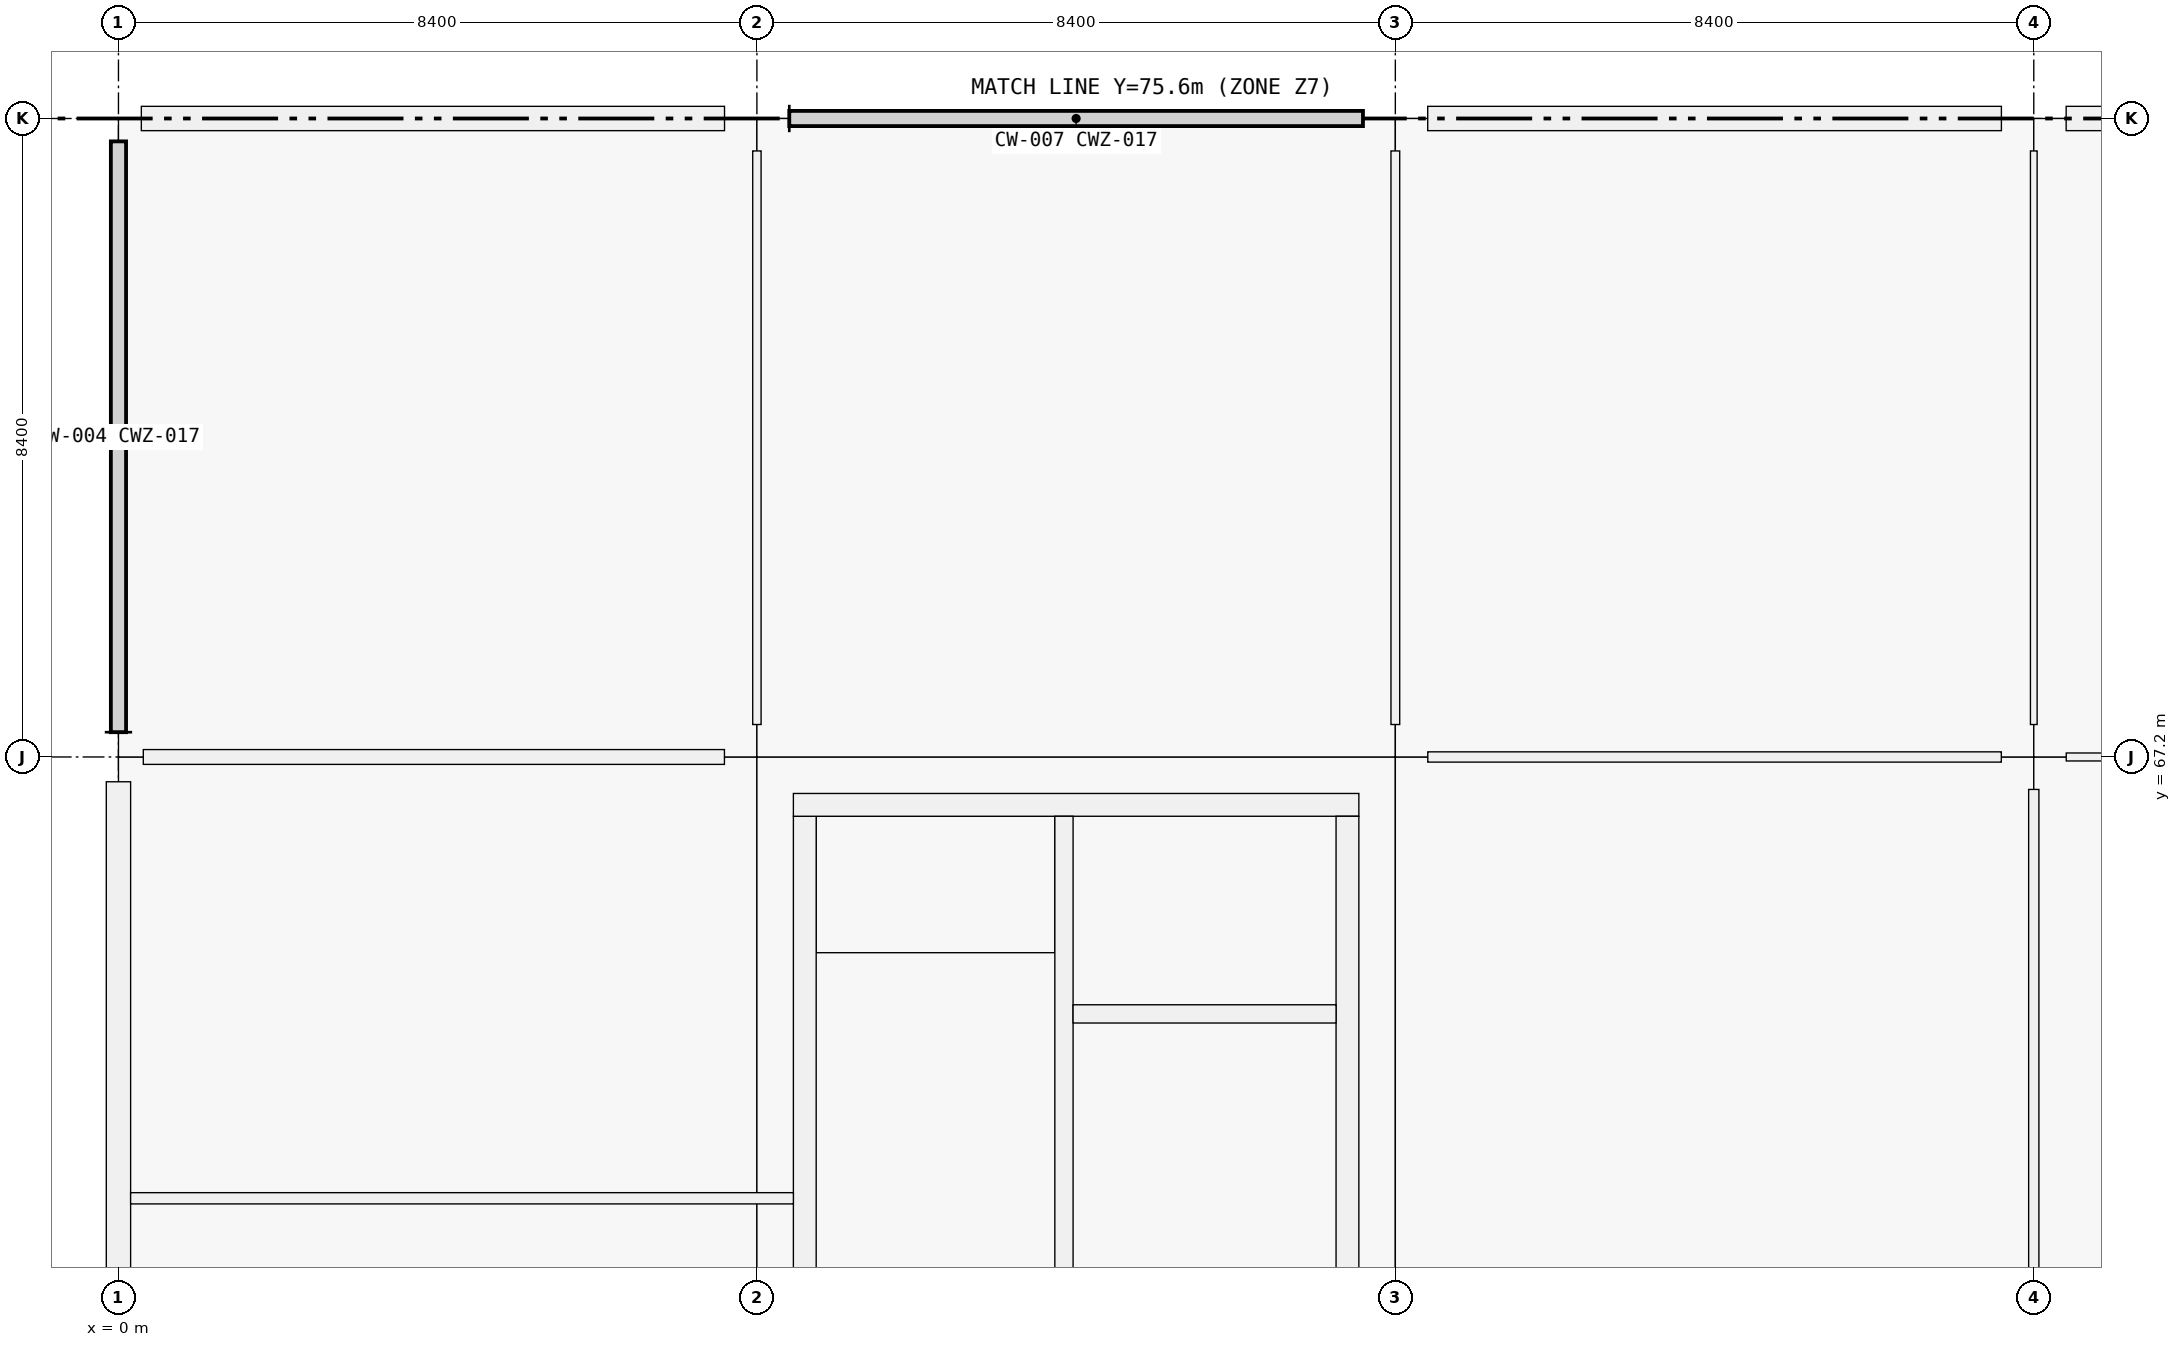
"""IFC4 building model, lengths in metres.
Left out: names, types, materials, properties, quantities, classifications, styles, units other than length and angle.
Written with IfcOpenShell. Run it as: python <this file> out.ifc"""

import sys

from ifc_helpers import new_model, si_unit, direction, frame, frame_2d, origin, origin_2d, place, context, subcontext, project, spatial, rectangle, extrude, element, fill, save


model = new_model("IFC4")
c1 = context("Model", 3, precision=1e-05, world=origin(), true_north=direction((0.0, 1.0)))
c2 = subcontext(c1, "Body", "Model", "MODEL_VIEW")
j1 = project(units=[si_unit("LENGTHUNIT", "METRE"), si_unit("PLANEANGLEUNIT", "RADIAN")], contexts=[c1])
p1 = place(None, origin())
s1 = spatial("IfcSite", under=j1, at=p1, CompositionType="ELEMENT")
p2 = place(p1, origin())
s2 = spatial("IfcBuilding", under=s1, at=p2, CompositionType="ELEMENT")
p3 = place(p2, origin())
s3 = spatial("IfcBuildingStorey", under=s2, at=p3, CompositionType="ELEMENT", Elevation=0.0)
p4 = place(p3, frame((0.0, 67.2, 0.0), z_axis=(0.0, 0.0, 1.0), x_axis=(1.0, 0.0, 0.0)))
e1 = element("IfcColumn", 1, at=p4, inside=s3, PredefinedType="COLUMN", context=c2, shape_type="SweptSolid", body=[
    extrude(rectangle(XDim=0.65, YDim=0.65, at=origin_2d()), origin(), (0.0, 0.0, 1.0), 5.76),
])
p5 = place(p3, frame((0.0, 75.6, 0.0), z_axis=(0.0, 0.0, 1.0), x_axis=(1.0, 0.0, 0.0)))
e2 = element("IfcColumn", 2, at=p5, inside=s3, PredefinedType="COLUMN", context=c2, shape_type="SweptSolid", body=[
    extrude(rectangle(XDim=0.6, YDim=0.6, at=origin_2d()), origin(), (0.0, 0.0, 1.0), 5.76),
])
for number, where, z_axis, x_axis in (
    (3, (8.4, 67.2, 0.0), (0.0, 0.0, 1.0), (1.0, 0.0, 0.0)),
    (4, (8.4, 75.6, 0.0), (0.0, 0.0, 1.0), (1.0, 0.0, 0.0)),
    (5, (16.8, 67.2, 0.0), (0.0, 0.0, 1.0), (1.0, 0.0, 0.0)),
    (6, (16.8, 75.6, 0.0), (0.0, 0.0, 1.0), (1.0, 0.0, 0.0)),
    (7, (25.2, 67.2, 0.0), (0.0, 0.0, 1.0), (1.0, 0.0, 0.0)),
    (8, (25.2, 75.6, 0.0), (0.0, 0.0, 1.0), (1.0, 0.0, 0.0)),
):
    element("IfcColumn", number, at=place(p3, frame(where, z_axis=z_axis, x_axis=x_axis)), inside=s3, PredefinedType="COLUMN", context=c2, shape_type="SweptSolid", body=[
        extrude(rectangle(XDim=0.85, YDim=0.85, at=origin_2d()), origin(), (0.0, 0.0, 1.0), 5.76),
    ])
p6 = place(p3, frame((0.0, 59.101, 0.0), z_axis=(0.0, 0.0, 1.0), x_axis=(0.0, 1.0, 0.0)))
e9 = element("IfcWall", 9, at=p6, inside=s3, PredefinedType="SOLIDWALL", context=c2, shape_type="SweptSolid", body=[
    extrude(rectangle(XDim=7.773, YDim=0.32, at=frame_2d((3.886, 0.0))), origin(), (0.0, 0.0, 1.0), 4.7),
])
p7 = place(p6, frame((3.136, 0.0, 0.9)))
e10 = element("IfcOpeningElement", 10, at=p7, cuts=e9, PredefinedType="OPENING", context=c2, shape_type="SweptSolid", body=[
    extrude(rectangle(XDim=1.5, YDim=1.8, at=frame_2d((0.75, 0.9))), frame((0.0, 0.16, 0.0), z_axis=(0.0, -1.0, 0.0), x_axis=(1.0, 0.0, 0.0)), (0.0, 0.0, 1.0), 0.32),
])
p8 = place(p6, frame((0.149, 0.0, 0.0)))
e11 = element("IfcOpeningElement", 11, at=p8, cuts=e9, PredefinedType="OPENING", context=c2, shape_type="SweptSolid", body=[
    extrude(rectangle(XDim=2.0, YDim=2.25, at=frame_2d((1.0, 1.125))), frame((0.0, 0.16, 0.0), z_axis=(0.0, -1.0, 0.0), x_axis=(1.0, 0.0, 0.0)), (0.0, 0.0, 1.0), 0.32),
])
p9 = place(p3, frame((0.301, 75.6, 0.0), z_axis=(0.0, 0.0, 1.0), x_axis=(1.0, 0.0, 0.0)))
e12 = element("IfcWall", 12, at=p9, inside=s3, PredefinedType="SOLIDWALL", context=c2, shape_type="SweptSolid", body=[
    extrude(rectangle(XDim=7.673, YDim=0.32, at=frame_2d((3.836, 0.0))), origin(), (0.0, 0.0, 1.0), 4.7),
])
p10 = place(p9, frame((3.037, 0.0, 0.9)))
e13 = element("IfcOpeningElement", 13, at=p10, cuts=e12, PredefinedType="OPENING", context=c2, shape_type="SweptSolid", body=[
    extrude(rectangle(XDim=1.6, YDim=2.1, at=frame_2d((0.8, 1.05))), frame((0.0, 0.16, 0.0), z_axis=(0.0, -1.0, 0.0), x_axis=(1.0, 0.0, 0.0)), (0.0, 0.0, 1.0), 0.32),
])
p11 = place(p3, frame((17.226, 75.6, 0.0), z_axis=(0.0, 0.0, 1.0), x_axis=(1.0, 0.0, 0.0)))
e14 = element("IfcWall", 14, at=p11, inside=s3, PredefinedType="SOLIDWALL", context=c2, shape_type="SweptSolid", body=[
    extrude(rectangle(XDim=7.548, YDim=0.32, at=frame_2d((3.774, 0.0))), origin(), (0.0, 0.0, 1.0), 4.7),
])
p12 = place(p11, frame((2.474, 0.0, 0.9)))
e15 = element("IfcOpeningElement", 15, at=p12, cuts=e14, PredefinedType="OPENING", context=c2, shape_type="SweptSolid", body=[
    extrude(rectangle(XDim=2.6, YDim=2.1, at=frame_2d((1.3, 1.05))), frame((0.0, 0.16, 0.0), z_axis=(0.0, -1.0, 0.0), x_axis=(1.0, 0.0, 0.0)), (0.0, 0.0, 1.0), 0.32),
])
p13 = place(p3, frame((25.626, 75.6, 0.0), z_axis=(0.0, 0.0, 1.0), x_axis=(1.0, 0.0, 0.0)))
e16 = element("IfcWall", 16, at=p13, inside=s3, PredefinedType="SOLIDWALL", context=c2, shape_type="SweptSolid", body=[
    extrude(rectangle(XDim=7.548, YDim=0.32, at=frame_2d((3.774, 0.0))), origin(), (0.0, 0.0, 1.0), 4.7),
])
p14 = place(p13, frame((2.374, 0.0, 0.9)))
e17 = element("IfcOpeningElement", 17, at=p14, cuts=e16, PredefinedType="OPENING", context=c2, shape_type="SweptSolid", body=[
    extrude(rectangle(XDim=2.8, YDim=1.75, at=frame_2d((1.4, 0.875))), frame((0.0, 0.16, 0.0), z_axis=(0.0, -1.0, 0.0), x_axis=(1.0, 0.0, 0.0)), (0.0, 0.0, 1.0), 0.32),
])
p15 = place(p3, frame((9.03, 59.58, 0.0), z_axis=(0.0, 0.0, 1.0), x_axis=(0.0, 1.0, 0.0)))
e18 = element("IfcWall", 18, at=p15, inside=s3, PredefinedType="SHEAR", context=c2, shape_type="SweptSolid", body=[
    extrude(rectangle(XDim=6.84, YDim=0.3, at=frame_2d((3.42, 0.0))), origin(), (0.0, 0.0, 1.0), 5.76),
])
p16 = place(p15, frame((0.12, 0.0, 0.0)))
e19 = element("IfcOpeningElement", 19, at=p16, cuts=e18, PredefinedType="OPENING", context=c2, shape_type="SweptSolid", body=[
    extrude(rectangle(XDim=1.0, YDim=2.15, at=frame_2d((0.5, 1.075))), frame((0.0, 0.15, 0.0), z_axis=(0.0, -1.0, 0.0), x_axis=(1.0, 0.0, 0.0)), (0.0, 0.0, 1.0), 0.3),
])
p17 = place(p3, frame((8.88, 66.57, 0.0), z_axis=(0.0, 0.0, 1.0), x_axis=(1.0, 0.0, 0.0)))
e20 = element("IfcWall", 20, at=p17, inside=s3, PredefinedType="SHEAR", context=c2, shape_type="SweptSolid", body=[
    extrude(rectangle(XDim=7.44, YDim=0.3, at=frame_2d((3.72, 0.0))), origin(), (0.0, 0.0, 1.0), 5.76),
])
p18 = place(p3, frame((16.17, 66.42, 0.0), z_axis=(0.0, 0.0, 1.0), x_axis=(0.0, -1.0, 0.0)))
e21 = element("IfcWall", 21, at=p18, inside=s3, PredefinedType="SHEAR", context=c2, shape_type="SweptSolid", body=[
    extrude(rectangle(XDim=6.84, YDim=0.3, at=frame_2d((3.42, 0.0))), origin(), (0.0, 0.0, 1.0), 5.76),
])
p19 = place(p3, frame((12.44, 59.58, 0.0), z_axis=(0.0, 0.0, 1.0), x_axis=(0.0, 1.0, 0.0)))
e22 = element("IfcWall", 22, at=p19, inside=s3, PredefinedType="SHEAR", context=c2, shape_type="SweptSolid", body=[
    extrude(rectangle(XDim=6.84, YDim=0.24, at=frame_2d((3.42, 0.0))), origin(), (0.0, 0.0, 1.0), 5.76),
])
p20 = place(p19, frame((0.12, 0.0, 0.0)))
e23 = element("IfcOpeningElement", 23, at=p20, cuts=e22, PredefinedType="OPENING", context=c2, shape_type="SweptSolid", body=[
    extrude(rectangle(XDim=1.0, YDim=2.15, at=frame_2d((0.5, 1.075))), frame((0.0, 0.12, 0.0), z_axis=(0.0, -1.0, 0.0), x_axis=(1.0, 0.0, 0.0)), (0.0, 0.0, 1.0), 0.24),
])
p21 = place(p3, frame((12.56, 63.82, 0.0), z_axis=(0.0, 0.0, 1.0), x_axis=(1.0, 0.0, 0.0)))
e24 = element("IfcWall", 24, at=p21, inside=s3, PredefinedType="SHEAR", context=c2, shape_type="SweptSolid", body=[
    extrude(rectangle(XDim=3.46, YDim=0.24, at=frame_2d((1.73, 0.0))), origin(), (0.0, 0.0, 1.0), 5.76),
])
p22 = place(p21, frame((1.18, 0.0, 0.0)))
e25 = element("IfcOpeningElement", 25, at=p22, cuts=e24, PredefinedType="OPENING", context=c2, shape_type="SweptSolid", body=[
    extrude(rectangle(XDim=1.1, YDim=2.15, at=frame_2d((0.55, 1.075))), frame((0.0, 0.12, 0.0), z_axis=(0.0, -1.0, 0.0), x_axis=(1.0, 0.0, 0.0)), (0.0, 0.0, 1.0), 0.24),
])
p23 = place(p3, frame((0.327, 67.2, 0.0), z_axis=(0.0, 0.0, 1.0), x_axis=(1.0, 0.0, 0.0)))
e26 = element("IfcWall", 26, at=p23, inside=s3, PredefinedType="PARTITIONING", context=c2, shape_type="SweptSolid", body=[
    extrude(rectangle(XDim=7.646, YDim=0.195, at=frame_2d((3.823, 0.0))), origin(), (0.0, 0.0, 1.0), 3.66),
])
p24 = place(p23, frame((3.313, 0.0, 0.0)))
e27 = element("IfcOpeningElement", 27, at=p24, cuts=e26, PredefinedType="OPENING", context=c2, shape_type="SweptSolid", body=[
    extrude(rectangle(XDim=1.02, YDim=2.2, at=frame_2d((0.51, 1.1))), frame((0.0, 0.098, 0.0), z_axis=(0.0, -1.0, 0.0), x_axis=(1.0, 0.0, 0.0)), (0.0, 0.0, 1.0), 0.195),
])
p25 = place(p3, frame((17.227, 67.2, 0.0), z_axis=(0.0, 0.0, 1.0), x_axis=(1.0, 0.0, 0.0)))
e28 = element("IfcWall", 28, at=p25, inside=s3, PredefinedType="PARTITIONING", context=c2, shape_type="SweptSolid", body=[
    extrude(rectangle(XDim=7.546, YDim=0.135, at=frame_2d((3.773, 0.0))), origin(), (0.0, 0.0, 1.0), 3.66),
])
p26 = place(p25, frame((3.283, 0.0, 0.0)))
e29 = element("IfcOpeningElement", 29, at=p26, cuts=e28, PredefinedType="OPENING", context=c2, shape_type="SweptSolid", body=[
    extrude(rectangle(XDim=0.98, YDim=2.18, at=frame_2d((0.49, 1.09))), frame((0.0, 0.067, 0.0), z_axis=(0.0, -1.0, 0.0), x_axis=(1.0, 0.0, 0.0)), (0.0, 0.0, 1.0), 0.135),
])
p27 = place(p3, frame((25.627, 67.2, 0.0), z_axis=(0.0, 0.0, 1.0), x_axis=(1.0, 0.0, 0.0)))
e30 = element("IfcWall", 30, at=p27, inside=s3, PredefinedType="PARTITIONING", context=c2, shape_type="SweptSolid", body=[
    extrude(rectangle(XDim=7.546, YDim=0.105, at=frame_2d((3.773, 0.0))), origin(), (0.0, 0.0, 1.0), 3.66),
])
p28 = place(p27, frame((3.248, 0.0, 0.0)))
e31 = element("IfcOpeningElement", 31, at=p28, cuts=e30, PredefinedType="OPENING", context=c2, shape_type="SweptSolid", body=[
    extrude(rectangle(XDim=1.05, YDim=2.12, at=frame_2d((0.525, 1.06))), frame((0.0, 0.052, 0.0), z_axis=(0.0, -1.0, 0.0), x_axis=(1.0, 0.0, 0.0)), (0.0, 0.0, 1.0), 0.105),
])
p29 = place(p3, frame((8.4, 67.627, 0.0), z_axis=(0.0, 0.0, 1.0), x_axis=(0.0, 1.0, 0.0)))
e32 = element("IfcWall", 32, at=p29, inside=s3, PredefinedType="MOVABLE", context=c2, shape_type="SweptSolid", body=[
    extrude(rectangle(XDim=7.546, YDim=0.11, at=frame_2d((3.773, 0.0))), origin(), (0.0, 0.0, 1.0), 3.66),
])
p30 = place(p29, frame((3.273, 0.0, 0.0)))
e33 = element("IfcOpeningElement", 33, at=p30, cuts=e32, PredefinedType="OPENING", context=c2, shape_type="SweptSolid", body=[
    extrude(rectangle(XDim=1.0, YDim=2.2, at=frame_2d((0.5, 1.1))), frame((0.0, 0.055, 0.0), z_axis=(0.0, -1.0, 0.0), x_axis=(1.0, 0.0, 0.0)), (0.0, 0.0, 1.0), 0.11),
])
p31 = place(p3, frame((16.8, 67.627, 0.0), z_axis=(0.0, 0.0, 1.0), x_axis=(0.0, 1.0, 0.0)))
e34 = element("IfcWall", 34, at=p31, inside=s3, PredefinedType="PARTITIONING", context=c2, shape_type="SweptSolid", body=[
    extrude(rectangle(XDim=7.546, YDim=0.115, at=frame_2d((3.773, 0.0))), origin(), (0.0, 0.0, 1.0), 3.66),
])
p32 = place(p31, frame((3.248, 0.0, 0.0)))
e35 = element("IfcOpeningElement", 35, at=p32, cuts=e34, PredefinedType="OPENING", context=c2, shape_type="SweptSolid", body=[
    extrude(rectangle(XDim=1.05, YDim=2.12, at=frame_2d((0.525, 1.06))), frame((0.0, 0.058, 0.0), z_axis=(0.0, -1.0, 0.0), x_axis=(1.0, 0.0, 0.0)), (0.0, 0.0, 1.0), 0.115),
])
p33 = place(p3, frame((25.2, 59.227, 0.0), z_axis=(0.0, 0.0, 1.0), x_axis=(0.0, 1.0, 0.0)))
e36 = element("IfcWall", 36, at=p33, inside=s3, PredefinedType="PARTITIONING", context=c2, shape_type="SweptSolid", body=[
    extrude(rectangle(XDim=7.546, YDim=0.135, at=frame_2d((3.773, 0.0))), origin(), (0.0, 0.0, 1.0), 3.66),
])
p34 = place(p33, frame((3.313, 0.0, 0.0)))
e37 = element("IfcOpeningElement", 37, at=p34, cuts=e36, PredefinedType="OPENING", context=c2, shape_type="SweptSolid", body=[
    extrude(rectangle(XDim=0.92, YDim=2.15, at=frame_2d((0.46, 1.075))), frame((0.0, 0.067, 0.0), z_axis=(0.0, -1.0, 0.0), x_axis=(1.0, 0.0, 0.0)), (0.0, 0.0, 1.0), 0.135),
])
p35 = place(p3, frame((25.2, 67.627, 0.0), z_axis=(0.0, 0.0, 1.0), x_axis=(0.0, 1.0, 0.0)))
e38 = element("IfcWall", 38, at=p35, inside=s3, PredefinedType="PARTITIONING", context=c2, shape_type="SweptSolid", body=[
    extrude(rectangle(XDim=7.546, YDim=0.088, at=frame_2d((3.773, 0.0))), origin(), (0.0, 0.0, 1.0), 3.66),
])
p36 = place(p35, frame((3.288, 0.0, 0.0)))
e39 = element("IfcOpeningElement", 39, at=p36, cuts=e38, PredefinedType="OPENING", context=c2, shape_type="SweptSolid", body=[
    extrude(rectangle(XDim=0.97, YDim=2.12, at=frame_2d((0.485, 1.06))), frame((0.0, 0.044, 0.0), z_axis=(0.0, -1.0, 0.0), x_axis=(1.0, 0.0, 0.0)), (0.0, 0.0, 1.0), 0.088),
])
p37 = place(p3, frame((0.16, 61.394, 0.0), z_axis=(0.0, 0.0, 1.0), x_axis=(1.0, 0.0, 0.0)))
e40 = element("IfcWall", 40, at=p37, inside=s3, PredefinedType="PARTITIONING", context=c2, shape_type="SweptSolid", body=[
    extrude(rectangle(XDim=8.72, YDim=0.148, at=frame_2d((4.36, 0.0))), origin(), (0.0, 0.0, 1.0), 3.66),
])
p38 = place(p7, origin())
e41 = element("IfcWindow", 41, at=p38, inside=s3, PartitioningType="SINGLE_PANEL", PredefinedType="WINDOW", context=c2, shape_type="SweptSolid", body=[
    extrude(rectangle(XDim=1.5, YDim=1.8, at=frame_2d((0.75, 0.9))), frame((0.0, 0.03, 0.0), z_axis=(0.0, -1.0, 0.0), x_axis=(1.0, 0.0, 0.0)), (0.0, 0.0, 1.0), 0.06),
])
fill(e10, e41)
p39 = place(p8, origin())
e42 = element("IfcDoor", 42, at=p39, inside=s3, OperationType="DOUBLE_DOOR_SINGLE_SWING", PredefinedType="DOOR", context=c2, shape_type="SweptSolid", body=[
    extrude(rectangle(XDim=2.0, YDim=2.25, at=frame_2d((1.0, 1.125))), frame((0.0, 0.025, 0.0), z_axis=(0.0, -1.0, 0.0), x_axis=(1.0, 0.0, 0.0)), (0.0, 0.0, 1.0), 0.05),
])
fill(e11, e42)
p40 = place(p10, origin())
e43 = element("IfcWindow", 43, at=p40, inside=s3, PartitioningType="SINGLE_PANEL", PredefinedType="WINDOW", context=c2, shape_type="SweptSolid", body=[
    extrude(rectangle(XDim=1.6, YDim=2.1, at=frame_2d((0.8, 1.05))), frame((0.0, 0.03, 0.0), z_axis=(0.0, -1.0, 0.0), x_axis=(1.0, 0.0, 0.0)), (0.0, 0.0, 1.0), 0.06),
])
fill(e13, e43)
p41 = place(p12, origin())
e44 = element("IfcWindow", 44, at=p41, inside=s3, PartitioningType="SINGLE_PANEL", PredefinedType="WINDOW", context=c2, shape_type="SweptSolid", body=[
    extrude(rectangle(XDim=2.6, YDim=2.1, at=frame_2d((1.3, 1.05))), frame((0.0, 0.03, 0.0), z_axis=(0.0, -1.0, 0.0), x_axis=(1.0, 0.0, 0.0)), (0.0, 0.0, 1.0), 0.06),
])
fill(e15, e44)
p42 = place(p20, origin())
e45 = element("IfcDoor", 45, at=p42, inside=s3, OperationType="SINGLE_SWING_LEFT", PredefinedType="DOOR", context=c2, shape_type="SweptSolid", body=[
    extrude(rectangle(XDim=1.0, YDim=2.15, at=frame_2d((0.5, 1.075))), frame((0.0, 0.025, 0.0), z_axis=(0.0, -1.0, 0.0), x_axis=(1.0, 0.0, 0.0)), (0.0, 0.0, 1.0), 0.05),
])
fill(e23, e45)
p43 = place(p16, origin())
e46 = element("IfcDoor", 46, at=p43, inside=s3, OperationType="SINGLE_SWING_RIGHT", PredefinedType="DOOR", context=c2, shape_type="SweptSolid", body=[
    extrude(rectangle(XDim=1.0, YDim=2.15, at=frame_2d((0.5, 1.075))), frame((0.0, 0.025, 0.0), z_axis=(0.0, -1.0, 0.0), x_axis=(1.0, 0.0, 0.0)), (0.0, 0.0, 1.0), 0.05),
])
fill(e19, e46)
p44 = place(p22, origin())
e47 = element("IfcDoor", 47, at=p44, inside=s3, OperationType="DOUBLE_DOOR_SLIDING", PredefinedType="DOOR", context=c2, shape_type="SweptSolid", body=[
    extrude(rectangle(XDim=1.1, YDim=2.15, at=frame_2d((0.55, 1.075))), frame((0.0, 0.025, 0.0), z_axis=(0.0, -1.0, 0.0), x_axis=(1.0, 0.0, 0.0)), (0.0, 0.0, 1.0), 0.05),
])
fill(e25, e47)
p45 = place(p26, origin())
e48 = element("IfcDoor", 48, at=p45, inside=s3, OperationType="SINGLE_SWING_RIGHT", PredefinedType="DOOR", context=c2, shape_type="SweptSolid", body=[
    extrude(rectangle(XDim=0.98, YDim=2.18, at=frame_2d((0.49, 1.09))), frame((0.0, 0.025, 0.0), z_axis=(0.0, -1.0, 0.0), x_axis=(1.0, 0.0, 0.0)), (0.0, 0.0, 1.0), 0.05),
])
fill(e29, e48)
p46 = place(p34, origin())
e49 = element("IfcDoor", 49, at=p46, inside=s3, OperationType="SINGLE_SWING_RIGHT", PredefinedType="DOOR", context=c2, shape_type="SweptSolid", body=[
    extrude(rectangle(XDim=0.92, YDim=2.15, at=frame_2d((0.46, 1.075))), frame((0.0, 0.025, 0.0), z_axis=(0.0, -1.0, 0.0), x_axis=(1.0, 0.0, 0.0)), (0.0, 0.0, 1.0), 0.05),
])
fill(e37, e49)
p47 = place(p24, origin())
e50 = element("IfcDoor", 50, at=p47, inside=s3, OperationType="SINGLE_SWING_LEFT", PredefinedType="DOOR", context=c2, shape_type="SweptSolid", body=[
    extrude(rectangle(XDim=1.02, YDim=2.2, at=frame_2d((0.51, 1.1))), frame((0.0, 0.025, 0.0), z_axis=(0.0, -1.0, 0.0), x_axis=(1.0, 0.0, 0.0)), (0.0, 0.0, 1.0), 0.05),
])
fill(e27, e50)
p48 = place(p30, origin())
e51 = element("IfcDoor", 51, at=p48, inside=s3, OperationType="SINGLE_SWING_RIGHT", PredefinedType="DOOR", context=c2, shape_type="SweptSolid", body=[
    extrude(rectangle(XDim=1.0, YDim=2.2, at=frame_2d((0.5, 1.1))), frame((0.0, 0.025, 0.0), z_axis=(0.0, -1.0, 0.0), x_axis=(1.0, 0.0, 0.0)), (0.0, 0.0, 1.0), 0.05),
])
fill(e33, e51)
p49 = place(p32, origin())
e52 = element("IfcDoor", 52, at=p49, inside=s3, OperationType="SINGLE_SWING_RIGHT", PredefinedType="DOOR", context=c2, shape_type="SweptSolid", body=[
    extrude(rectangle(XDim=1.05, YDim=2.12, at=frame_2d((0.525, 1.06))), frame((0.0, 0.025, 0.0), z_axis=(0.0, -1.0, 0.0), x_axis=(1.0, 0.0, 0.0)), (0.0, 0.0, 1.0), 0.05),
])
fill(e35, e52)
p50 = place(p36, origin())
e53 = element("IfcDoor", 53, at=p50, inside=s3, OperationType="SINGLE_SWING_RIGHT", PredefinedType="DOOR", context=c2, shape_type="SweptSolid", body=[
    extrude(rectangle(XDim=0.97, YDim=2.12, at=frame_2d((0.485, 1.06))), frame((0.0, 0.025, 0.0), z_axis=(0.0, -1.0, 0.0), x_axis=(1.0, 0.0, 0.0)), (0.0, 0.0, 1.0), 0.05),
])
fill(e39, e53)
save(model, sys.argv[1])
